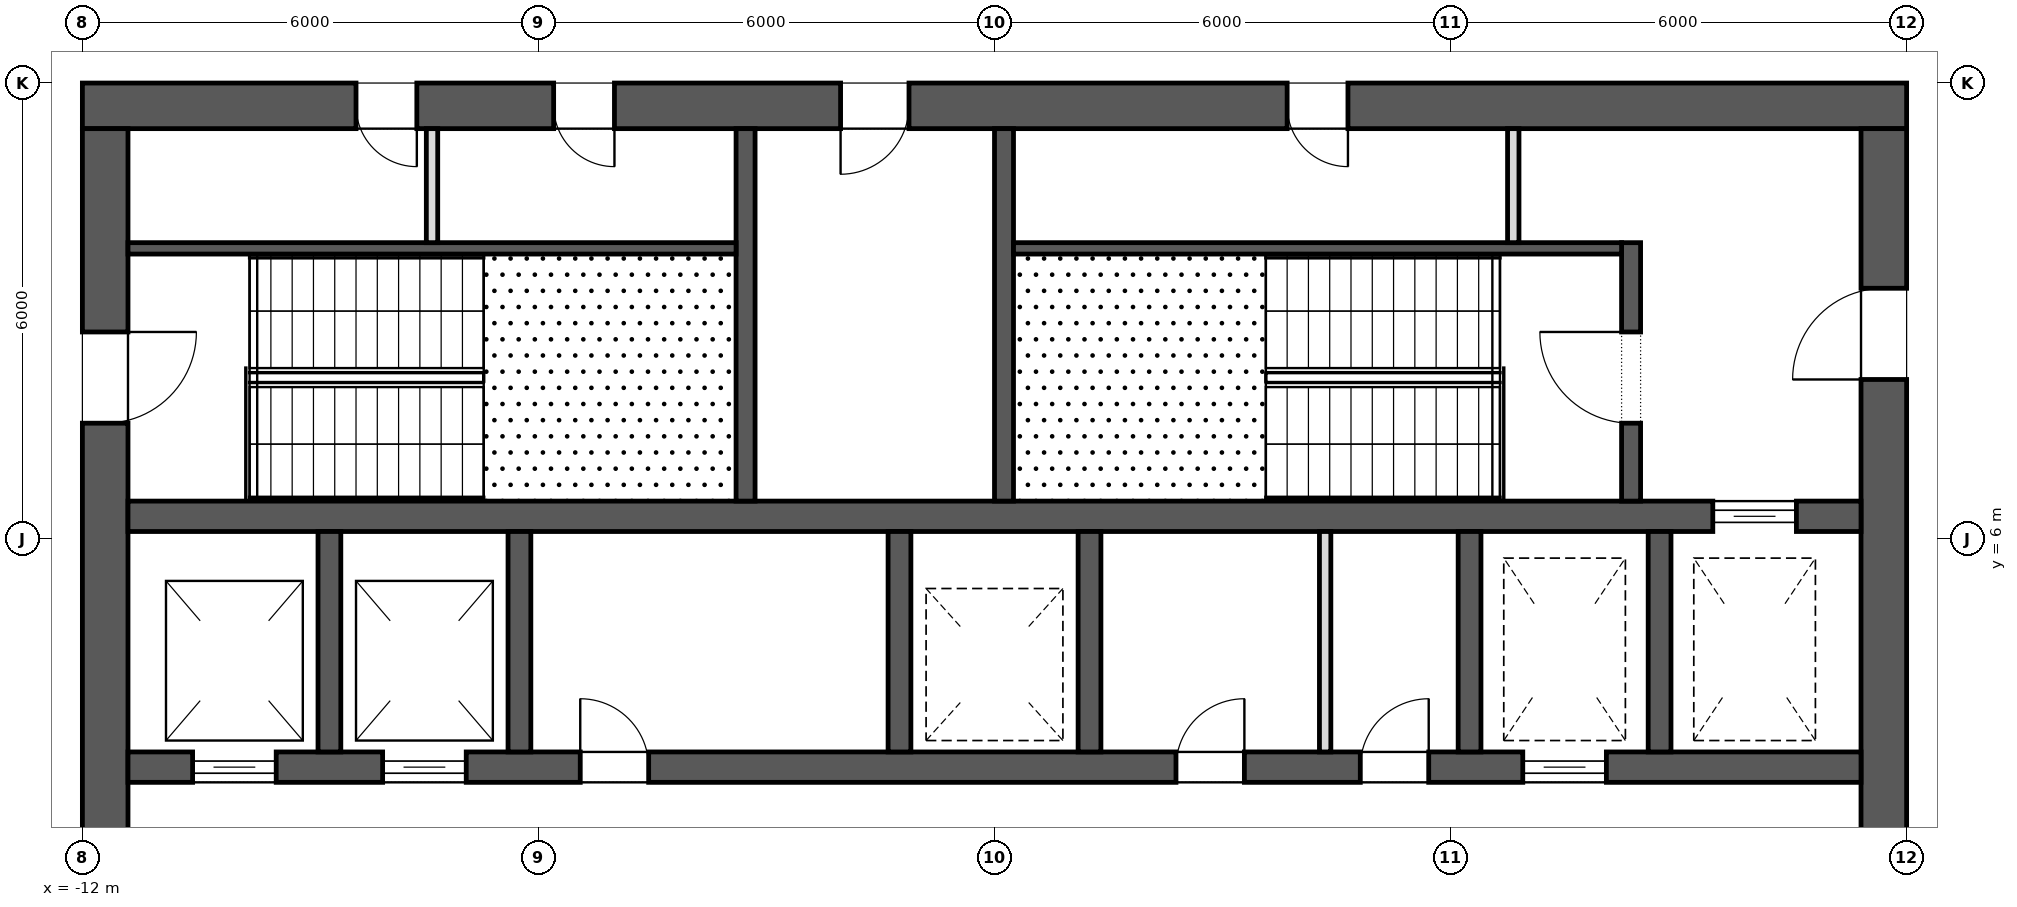
"""IFC4 building model, lengths in metres.
Left out: names, types, materials, properties, quantities, classifications, styles, units other than length and angle.
Written with IfcOpenShell. Run it as: python <this file> out.ifc"""

import sys

from ifc_helpers import new_model, si_unit, direction, frame, frame_2d, origin, place, context, subcontext, project, spatial, rectangle, extrude, element, fill, save


model = new_model("IFC4")
c1 = context("Model", 3, precision=1e-05, world=origin(), true_north=direction((0.0, 1.0)))
c2 = subcontext(c1, "Body", "Model", "MODEL_VIEW")
j1 = project(units=[si_unit("LENGTHUNIT", "METRE"), si_unit("PLANEANGLEUNIT", "RADIAN")], contexts=[c1])
p1 = place(None, origin())
s1 = spatial("IfcSite", under=j1, at=p1, CompositionType="ELEMENT")
p2 = place(p1, origin())
s2 = spatial("IfcBuilding", under=s1, at=p2, CompositionType="ELEMENT")
p3 = place(p2, frame((0.0, 0.0, 276.3)))
s3 = spatial("IfcBuildingStorey", under=s2, at=p3, CompositionType="ELEMENT", Elevation=276.3)
p4 = place(p3, frame((-12.0, 11.7, 0.0), z_axis=(0.0, 0.0, 1.0), x_axis=(1.0, 0.0, 0.0)))
e1 = element("IfcWall", 1, at=p4, inside=s3, PredefinedType="SHEAR", context=c2, shape_type="SweptSolid", body=[
    extrude(rectangle(XDim=24.0, YDim=0.6, at=frame_2d((12.0, 0.0))), origin(), (0.0, 0.0, 1.0), 4.0),
])
p5 = place(p4, frame((9.975, 0.0, 0.0)))
e2 = element("IfcOpeningElement", 2, at=p5, cuts=e1, PredefinedType="OPENING", context=c2, shape_type="SweptSolid", body=[
    extrude(rectangle(XDim=0.9, YDim=2.1, at=frame_2d((0.45, 1.05))), frame((0.0, 0.312, 0.0), z_axis=(0.0, -1.0, 0.0), x_axis=(1.0, 0.0, 0.0)), (0.0, 0.0, 1.0), 0.624),
])
p6 = place(p4, frame((3.6, 0.0, 0.0)))
e3 = element("IfcOpeningElement", 3, at=p6, cuts=e1, PredefinedType="OPENING", context=c2, shape_type="SweptSolid", body=[
    extrude(rectangle(XDim=0.8, YDim=2.1, at=frame_2d((0.4, 1.05))), frame((0.0, 0.312, 0.0), z_axis=(0.0, -1.0, 0.0), x_axis=(1.0, 0.0, 0.0)), (0.0, 0.0, 1.0), 0.624),
])
p7 = place(p4, frame((6.2, 0.0, 0.0)))
e4 = element("IfcOpeningElement", 4, at=p7, cuts=e1, PredefinedType="OPENING", context=c2, shape_type="SweptSolid", body=[
    extrude(rectangle(XDim=0.8, YDim=2.1, at=frame_2d((0.4, 1.05))), frame((0.0, 0.312, 0.0), z_axis=(0.0, -1.0, 0.0), x_axis=(1.0, 0.0, 0.0)), (0.0, 0.0, 1.0), 0.624),
])
p8 = place(p4, frame((15.85, 0.0, 0.0)))
e5 = element("IfcOpeningElement", 5, at=p8, cuts=e1, PredefinedType="OPENING", context=c2, shape_type="SweptSolid", body=[
    extrude(rectangle(XDim=0.8, YDim=2.1, at=frame_2d((0.4, 1.05))), frame((0.0, 0.312, 0.0), z_axis=(0.0, -1.0, 0.0), x_axis=(1.0, 0.0, 0.0)), (0.0, 0.0, 1.0), 0.624),
])
p9 = place(p3, frame((11.7, -11.4, 0.0), z_axis=(0.0, 0.0, 1.0), x_axis=(0.0, 1.0, 0.0)))
e6 = element("IfcWall", 6, at=p9, inside=s3, PredefinedType="SHEAR", context=c2, shape_type="SweptSolid", body=[
    extrude(rectangle(XDim=22.8, YDim=0.6, at=frame_2d((11.4, 0.0))), origin(), (0.0, 0.0, 1.0), 4.0),
])
p10 = place(p9, frame((10.2, 0.0, 0.0)))
e7 = element("IfcOpeningElement", 7, at=p10, cuts=e6, PredefinedType="OPENING", context=c2, shape_type="SweptSolid", body=[
    extrude(rectangle(XDim=2.4, YDim=2.1, at=frame_2d((1.2, 1.05))), frame((0.0, 0.312, 0.0), z_axis=(0.0, -1.0, 0.0), x_axis=(1.0, 0.0, 0.0)), (0.0, 0.0, 1.0), 0.624),
])
p11 = place(p9, frame((19.5, 0.0, 0.0)))
e8 = element("IfcOpeningElement", 8, at=p11, cuts=e6, PredefinedType="OPENING", context=c2, shape_type="SweptSolid", body=[
    extrude(rectangle(XDim=1.2, YDim=2.1, at=frame_2d((0.6, 1.05))), frame((0.0, 0.312, 0.0), z_axis=(0.0, -1.0, 0.0), x_axis=(1.0, 0.0, 0.0)), (0.0, 0.0, 1.0), 0.624),
])
p12 = place(p9, frame((2.1, 0.0, 0.0)))
e9 = element("IfcOpeningElement", 9, at=p12, cuts=e6, PredefinedType="OPENING", context=c2, shape_type="SweptSolid", body=[
    extrude(rectangle(XDim=1.2, YDim=2.1, at=frame_2d((0.6, 1.05))), frame((0.0, 0.312, 0.0), z_axis=(0.0, -1.0, 0.0), x_axis=(1.0, 0.0, 0.0)), (0.0, 0.0, 1.0), 0.624),
])
p13 = place(p3, frame((-11.7, -11.4, 0.0), z_axis=(0.0, 0.0, 1.0), x_axis=(0.0, 1.0, 0.0)))
e10 = element("IfcWall", 10, at=p13, inside=s3, PredefinedType="SHEAR", context=c2, shape_type="SweptSolid", body=[
    extrude(rectangle(XDim=22.8, YDim=0.6, at=frame_2d((11.4, 0.0))), origin(), (0.0, 0.0, 1.0), 4.0),
])
p14 = place(p13, frame((10.2, 0.0, 0.0)))
e11 = element("IfcOpeningElement", 11, at=p14, cuts=e10, PredefinedType="OPENING", context=c2, shape_type="SweptSolid", body=[
    extrude(rectangle(XDim=2.4, YDim=2.1, at=frame_2d((1.2, 1.05))), frame((0.0, 0.312, 0.0), z_axis=(0.0, -1.0, 0.0), x_axis=(1.0, 0.0, 0.0)), (0.0, 0.0, 1.0), 0.624),
])
p15 = place(p13, frame((18.925, 0.0, 0.0)))
e12 = element("IfcOpeningElement", 12, at=p15, cuts=e10, PredefinedType="OPENING", context=c2, shape_type="SweptSolid", body=[
    extrude(rectangle(XDim=1.2, YDim=2.1, at=frame_2d((0.6, 1.05))), frame((0.0, 0.312, 0.0), z_axis=(0.0, -1.0, 0.0), x_axis=(1.0, 0.0, 0.0)), (0.0, 0.0, 1.0), 0.624),
])
p16 = place(p13, frame((2.675, 0.0, 0.0)))
e13 = element("IfcOpeningElement", 13, at=p16, cuts=e10, PredefinedType="OPENING", context=c2, shape_type="SweptSolid", body=[
    extrude(rectangle(XDim=1.2, YDim=2.1, at=frame_2d((0.6, 1.05))), frame((0.0, 0.312, 0.0), z_axis=(0.0, -1.0, 0.0), x_axis=(1.0, 0.0, 0.0)), (0.0, 0.0, 1.0), 0.624),
])
p17 = place(p3, frame((-11.4, 3.0, 0.0), z_axis=(0.0, 0.0, 1.0), x_axis=(1.0, 0.0, 0.0)))
e14 = element("IfcWall", 14, at=p17, inside=s3, PredefinedType="SHEAR", context=c2, shape_type="SweptSolid", body=[
    extrude(rectangle(XDim=22.8, YDim=0.4, at=frame_2d((11.4, 0.0))), origin(), (0.0, 0.0, 1.0), 4.0),
])
p18 = place(p17, frame((0.85, 0.0, 0.0)))
e15 = element("IfcOpeningElement", 15, at=p18, cuts=e14, PredefinedType="OPENING", context=c2, shape_type="SweptSolid", body=[
    extrude(rectangle(XDim=1.1, YDim=2.1, at=frame_2d((0.55, 1.05))), frame((0.0, 0.212, 0.0), z_axis=(0.0, -1.0, 0.0), x_axis=(1.0, 0.0, 0.0)), (0.0, 0.0, 1.0), 0.424),
])
p19 = place(p17, frame((3.35, 0.0, 0.0)))
e16 = element("IfcOpeningElement", 16, at=p19, cuts=e14, PredefinedType="OPENING", context=c2, shape_type="SweptSolid", body=[
    extrude(rectangle(XDim=1.1, YDim=2.1, at=frame_2d((0.55, 1.05))), frame((0.0, 0.212, 0.0), z_axis=(0.0, -1.0, 0.0), x_axis=(1.0, 0.0, 0.0)), (0.0, 0.0, 1.0), 0.424),
])
p20 = place(p17, frame((18.35, 0.0, 0.0)))
e17 = element("IfcOpeningElement", 17, at=p20, cuts=e14, PredefinedType="OPENING", context=c2, shape_type="SweptSolid", body=[
    extrude(rectangle(XDim=1.1, YDim=2.1, at=frame_2d((0.55, 1.05))), frame((0.0, 0.212, 0.0), z_axis=(0.0, -1.0, 0.0), x_axis=(1.0, 0.0, 0.0)), (0.0, 0.0, 1.0), 0.424),
])
p21 = place(p17, frame((13.788, 0.0, 0.0)))
e18 = element("IfcOpeningElement", 18, at=p21, cuts=e14, PredefinedType="OPENING", context=c2, shape_type="SweptSolid", body=[
    extrude(rectangle(XDim=0.9, YDim=2.1, at=frame_2d((0.45, 1.05))), frame((0.0, 0.212, 0.0), z_axis=(0.0, -1.0, 0.0), x_axis=(1.0, 0.0, 0.0)), (0.0, 0.0, 1.0), 0.424),
])
p22 = place(p17, frame((16.212, 0.0, 0.0)))
e19 = element("IfcOpeningElement", 19, at=p22, cuts=e14, PredefinedType="OPENING", context=c2, shape_type="SweptSolid", body=[
    extrude(rectangle(XDim=0.9, YDim=2.1, at=frame_2d((0.45, 1.05))), frame((0.0, 0.212, 0.0), z_axis=(0.0, -1.0, 0.0), x_axis=(1.0, 0.0, 0.0)), (0.0, 0.0, 1.0), 0.424),
])
p23 = place(p17, frame((5.95, 0.0, 0.0)))
e20 = element("IfcOpeningElement", 20, at=p23, cuts=e14, PredefinedType="OPENING", context=c2, shape_type="SweptSolid", body=[
    extrude(rectangle(XDim=0.9, YDim=2.1, at=frame_2d((0.45, 1.05))), frame((0.0, 0.212, 0.0), z_axis=(0.0, -1.0, 0.0), x_axis=(1.0, 0.0, 0.0)), (0.0, 0.0, 1.0), 0.424),
])
p24 = place(p3, frame((-11.4, 6.3, 0.0), z_axis=(0.0, 0.0, 1.0), x_axis=(1.0, 0.0, 0.0)))
e21 = element("IfcWall", 21, at=p24, inside=s3, PredefinedType="SHEAR", context=c2, shape_type="SweptSolid", body=[
    extrude(rectangle(XDim=22.8, YDim=0.4, at=frame_2d((11.4, 0.0))), origin(), (0.0, 0.0, 1.0), 4.0),
])
p25 = place(p24, frame((20.85, 0.0, 0.0)))
e22 = element("IfcOpeningElement", 22, at=p25, cuts=e21, PredefinedType="OPENING", context=c2, shape_type="SweptSolid", body=[
    extrude(rectangle(XDim=1.1, YDim=2.1, at=frame_2d((0.55, 1.05))), frame((0.0, 0.212, 0.0), z_axis=(0.0, -1.0, 0.0), x_axis=(1.0, 0.0, 0.0)), (0.0, 0.0, 1.0), 0.424),
])
for number, where, z_axis, x_axis in (
    (23, (-8.75, 3.2, 0.0), (0.0, 0.0, 1.0), (0.0, 1.0, 0.0)),
    (24, (-6.25, 3.2, 0.0), (0.0, 0.0, 1.0), (0.0, 1.0, 0.0)),
    (25, (-1.25, 3.2, 0.0), (0.0, 0.0, 1.0), (0.0, 1.0, 0.0)),
    (26, (1.25, 3.2, 0.0), (0.0, 0.0, 1.0), (0.0, 1.0, 0.0)),
    (27, (6.25, 3.2, 0.0), (0.0, 0.0, 1.0), (0.0, 1.0, 0.0)),
    (28, (8.75, 3.2, 0.0), (0.0, 0.0, 1.0), (0.0, 1.0, 0.0)),
):
    element("IfcWall", number, at=place(p3, frame(where, z_axis=z_axis, x_axis=x_axis)), inside=s3, PredefinedType="SHEAR", context=c2, shape_type="SweptSolid", body=[
        extrude(rectangle(XDim=2.9, YDim=0.3, at=frame_2d((1.45, 0.0))), origin(), (0.0, 0.0, 1.0), 4.0),
    ])
for number, where, z_axis, x_axis in (
    (29, (-3.275, 6.5, 0.0), (0.0, 0.0, 1.0), (0.0, 1.0, 0.0)),
    (30, (0.125, 6.5, 0.0), (0.0, 0.0, 1.0), (0.0, 1.0, 0.0)),
):
    element("IfcWall", number, at=place(p3, frame(where, z_axis=z_axis, x_axis=x_axis)), inside=s3, PredefinedType="SHEAR", context=c2, shape_type="SweptSolid", body=[
        extrude(rectangle(XDim=4.9, YDim=0.25, at=frame_2d((2.45, 0.0))), origin(), (0.0, 0.0, 1.0), 3.7),
    ])
p26 = place(p3, frame((8.375, 6.5, 0.0), z_axis=(0.0, 0.0, 1.0), x_axis=(0.0, 1.0, 0.0)))
e31 = element("IfcWall", 31, at=p26, inside=s3, PredefinedType="SHEAR", context=c2, shape_type="SweptSolid", body=[
    extrude(rectangle(XDim=3.4, YDim=0.25, at=frame_2d((1.7, 0.0))), origin(), (0.0, 0.0, 1.0), 3.7),
])
p27 = place(p26, frame((1.025, 0.0, 0.0)))
e32 = element("IfcOpeningElement", 32, at=p27, cuts=e31, PredefinedType="OPENING", context=c2, shape_type="SweptSolid", body=[
    extrude(rectangle(XDim=1.2, YDim=2.1, at=frame_2d((0.6, 1.05))), frame((0.0, 0.137, 0.0), z_axis=(0.0, -1.0, 0.0), x_axis=(1.0, 0.0, 0.0)), (0.0, 0.0, 1.0), 0.274),
])
for number, where, z_axis, x_axis in (
    (33, (-11.4, 9.825, 0.0), (0.0, 0.0, 1.0), (1.0, 0.0, 0.0)),
    (34, (0.25, 9.825, 0.0), (0.0, 0.0, 1.0), (1.0, 0.0, 0.0)),
):
    element("IfcWall", number, at=place(p3, frame(where, z_axis=z_axis, x_axis=x_axis)), inside=s3, PredefinedType="SHEAR", context=c2, shape_type="SweptSolid", body=[
        extrude(rectangle(XDim=8.0, YDim=0.15, at=frame_2d((4.0, 0.0))), origin(), (0.0, 0.0, 1.0), 3.7),
    ])
for number, where, z_axis, x_axis in (
    (35, (-7.4, 9.9, 0.0), (0.0, 0.0, 1.0), (0.0, 1.0, 0.0)),
    (36, (6.825, 9.9, 0.0), (0.0, 0.0, 1.0), (0.0, 1.0, 0.0)),
):
    element("IfcWall", number, at=place(p3, frame(where, z_axis=z_axis, x_axis=x_axis)), inside=s3, PredefinedType="PARTITIONING", context=c2, shape_type="SweptSolid", body=[
        extrude(rectangle(XDim=1.5, YDim=0.15, at=frame_2d((0.75, 0.0))), origin(), (0.0, 0.0, 1.0), 3.7),
    ])
p28 = place(p3, frame((4.35, 3.2, 0.0), z_axis=(0.0, 0.0, 1.0), x_axis=(0.0, 1.0, 0.0)))
e37 = element("IfcWall", 37, at=p28, inside=s3, PredefinedType="PARTITIONING", context=c2, shape_type="SweptSolid", body=[
    extrude(rectangle(XDim=2.9, YDim=0.15, at=frame_2d((1.45, 0.0))), origin(), (0.0, 0.0, 1.0), 3.7),
])
p29 = place(p25, origin())
e38 = element("IfcDoor", 38, at=p29, inside=s3, OperationType="SLIDING_TO_LEFT", PredefinedType="DOOR", context=c2, shape_type="SweptSolid", body=[
    extrude(rectangle(XDim=1.1, YDim=2.1, at=frame_2d((0.55, 1.05))), frame((0.0, 0.025, 0.0), z_axis=(0.0, -1.0, 0.0), x_axis=(1.0, 0.0, 0.0)), (0.0, 0.0, 1.0), 0.05),
])
fill(e22, e38)
p30 = place(p18, origin())
e39 = element("IfcDoor", 39, at=p30, inside=s3, OperationType="SLIDING_TO_LEFT", PredefinedType="DOOR", context=c2, shape_type="SweptSolid", body=[
    extrude(rectangle(XDim=1.1, YDim=2.1, at=frame_2d((0.55, 1.05))), frame((0.0, 0.025, 0.0), z_axis=(0.0, -1.0, 0.0), x_axis=(1.0, 0.0, 0.0)), (0.0, 0.0, 1.0), 0.05),
])
fill(e15, e39)
p31 = place(p19, origin())
e40 = element("IfcDoor", 40, at=p31, inside=s3, OperationType="SLIDING_TO_LEFT", PredefinedType="DOOR", context=c2, shape_type="SweptSolid", body=[
    extrude(rectangle(XDim=1.1, YDim=2.1, at=frame_2d((0.55, 1.05))), frame((0.0, 0.025, 0.0), z_axis=(0.0, -1.0, 0.0), x_axis=(1.0, 0.0, 0.0)), (0.0, 0.0, 1.0), 0.05),
])
fill(e16, e40)
p32 = place(p20, origin())
e41 = element("IfcDoor", 41, at=p32, inside=s3, OperationType="SLIDING_TO_LEFT", PredefinedType="DOOR", context=c2, shape_type="SweptSolid", body=[
    extrude(rectangle(XDim=1.1, YDim=2.1, at=frame_2d((0.55, 1.05))), frame((0.0, 0.025, 0.0), z_axis=(0.0, -1.0, 0.0), x_axis=(1.0, 0.0, 0.0)), (0.0, 0.0, 1.0), 0.05),
])
fill(e17, e41)
p33 = place(p15, frame((1.2, 0.0, 0.0), z_axis=(0.0, 0.0, 1.0), x_axis=(-1.0, 0.0, 0.0)))
e42 = element("IfcDoor", 42, at=p33, inside=s3, OperationType="SINGLE_SWING_RIGHT", PredefinedType="DOOR", context=c2, shape_type="SweptSolid", body=[
    extrude(rectangle(XDim=1.2, YDim=2.1, at=frame_2d((0.6, 1.05))), frame((0.0, 0.025, 0.0), z_axis=(0.0, -1.0, 0.0), x_axis=(1.0, 0.0, 0.0)), (0.0, 0.0, 1.0), 0.05),
])
fill(e12, e42)
p34 = place(p27, origin())
e43 = element("IfcDoor", 43, at=p34, inside=s3, OperationType="SINGLE_SWING_LEFT", PredefinedType="DOOR", context=c2, shape_type="SweptSolid", body=[
    extrude(rectangle(XDim=1.2, YDim=2.1, at=frame_2d((0.6, 1.05))), frame((0.0, 0.025, 0.0), z_axis=(0.0, -1.0, 0.0), x_axis=(1.0, 0.0, 0.0)), (0.0, 0.0, 1.0), 0.05),
])
fill(e32, e43)
p35 = place(p11, origin())
e44 = element("IfcDoor", 44, at=p35, inside=s3, OperationType="SINGLE_SWING_RIGHT", PredefinedType="DOOR", context=c2, shape_type="SweptSolid", body=[
    extrude(rectangle(XDim=1.2, YDim=2.1, at=frame_2d((0.6, 1.05))), frame((0.0, 0.025, 0.0), z_axis=(0.0, -1.0, 0.0), x_axis=(1.0, 0.0, 0.0)), (0.0, 0.0, 1.0), 0.05),
])
fill(e8, e44)
p36 = place(p5, frame((0.9, 0.0, 0.0), z_axis=(0.0, 0.0, 1.0), x_axis=(-1.0, 0.0, 0.0)))
e45 = element("IfcDoor", 45, at=p36, inside=s3, OperationType="SINGLE_SWING_LEFT", PredefinedType="DOOR", context=c2, shape_type="SweptSolid", body=[
    extrude(rectangle(XDim=0.9, YDim=2.1, at=frame_2d((0.45, 1.05))), frame((0.0, 0.025, 0.0), z_axis=(0.0, -1.0, 0.0), x_axis=(1.0, 0.0, 0.0)), (0.0, 0.0, 1.0), 0.05),
])
fill(e2, e45)
p37 = place(p6, frame((0.8, 0.0, 0.0), z_axis=(0.0, 0.0, 1.0), x_axis=(-1.0, 0.0, 0.0)))
e46 = element("IfcDoor", 46, at=p37, inside=s3, OperationType="SINGLE_SWING_RIGHT", PredefinedType="DOOR", context=c2, shape_type="SweptSolid", body=[
    extrude(rectangle(XDim=0.8, YDim=2.1, at=frame_2d((0.4, 1.05))), frame((0.0, 0.025, 0.0), z_axis=(0.0, -1.0, 0.0), x_axis=(1.0, 0.0, 0.0)), (0.0, 0.0, 1.0), 0.05),
])
fill(e3, e46)
p38 = place(p7, frame((0.8, 0.0, 0.0), z_axis=(0.0, 0.0, 1.0), x_axis=(-1.0, 0.0, 0.0)))
e47 = element("IfcDoor", 47, at=p38, inside=s3, OperationType="SINGLE_SWING_RIGHT", PredefinedType="DOOR", context=c2, shape_type="SweptSolid", body=[
    extrude(rectangle(XDim=0.8, YDim=2.1, at=frame_2d((0.4, 1.05))), frame((0.0, 0.025, 0.0), z_axis=(0.0, -1.0, 0.0), x_axis=(1.0, 0.0, 0.0)), (0.0, 0.0, 1.0), 0.05),
])
fill(e4, e47)
p39 = place(p8, frame((0.8, 0.0, 0.0), z_axis=(0.0, 0.0, 1.0), x_axis=(-1.0, 0.0, 0.0)))
e48 = element("IfcDoor", 48, at=p39, inside=s3, OperationType="SINGLE_SWING_RIGHT", PredefinedType="DOOR", context=c2, shape_type="SweptSolid", body=[
    extrude(rectangle(XDim=0.8, YDim=2.1, at=frame_2d((0.4, 1.05))), frame((0.0, 0.025, 0.0), z_axis=(0.0, -1.0, 0.0), x_axis=(1.0, 0.0, 0.0)), (0.0, 0.0, 1.0), 0.05),
])
fill(e5, e48)
p40 = place(p21, origin())
e49 = element("IfcDoor", 49, at=p40, inside=s3, OperationType="SINGLE_SWING_LEFT", PredefinedType="DOOR", context=c2, shape_type="SweptSolid", body=[
    extrude(rectangle(XDim=0.9, YDim=2.1, at=frame_2d((0.45, 1.05))), frame((0.0, 0.025, 0.0), z_axis=(0.0, -1.0, 0.0), x_axis=(1.0, 0.0, 0.0)), (0.0, 0.0, 1.0), 0.05),
])
fill(e18, e49)
p41 = place(p22, origin())
e50 = element("IfcDoor", 50, at=p41, inside=s3, OperationType="SINGLE_SWING_LEFT", PredefinedType="DOOR", context=c2, shape_type="SweptSolid", body=[
    extrude(rectangle(XDim=0.9, YDim=2.1, at=frame_2d((0.45, 1.05))), frame((0.0, 0.025, 0.0), z_axis=(0.0, -1.0, 0.0), x_axis=(1.0, 0.0, 0.0)), (0.0, 0.0, 1.0), 0.05),
])
fill(e19, e50)
p42 = place(p23, origin())
e51 = element("IfcDoor", 51, at=p42, inside=s3, OperationType="SINGLE_SWING_RIGHT", PredefinedType="DOOR", context=c2, shape_type="SweptSolid", body=[
    extrude(rectangle(XDim=0.9, YDim=2.1, at=frame_2d((0.45, 1.05))), frame((0.0, 0.025, 0.0), z_axis=(0.0, -1.0, 0.0), x_axis=(1.0, 0.0, 0.0)), (0.0, 0.0, 1.0), 0.05),
])
fill(e20, e51)
save(model, sys.argv[1])
